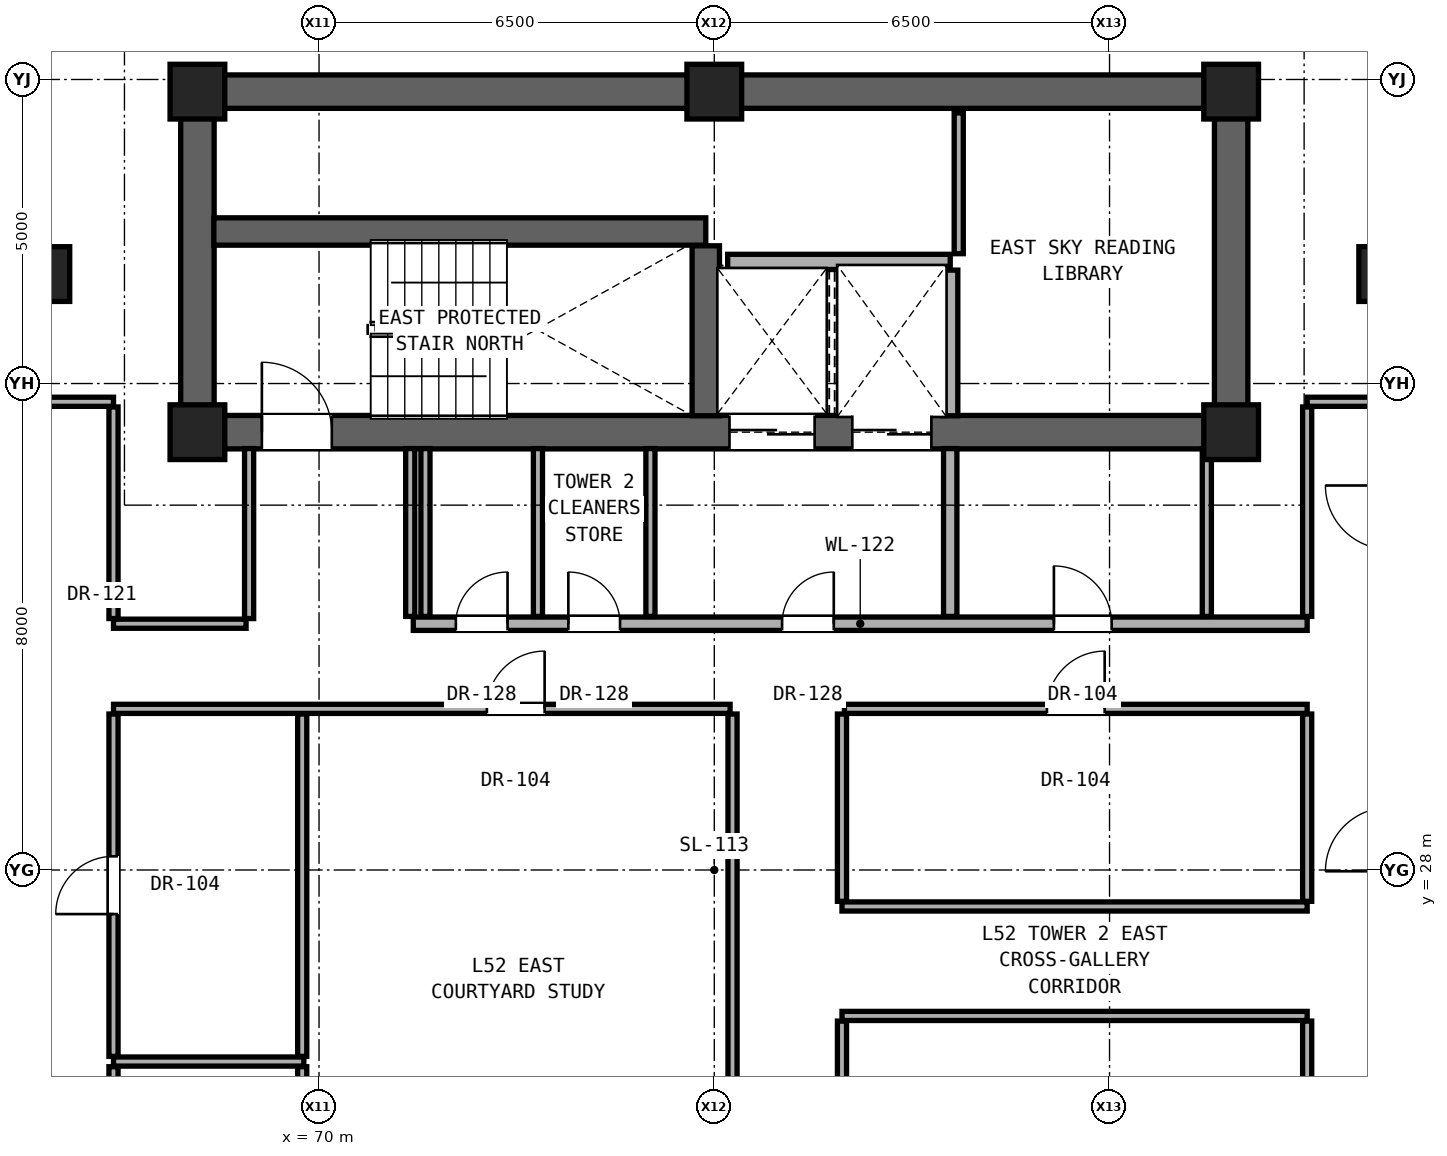
"""IFC4 building model, lengths in metres.
Left out: names, types, materials, properties, quantities, classifications, styles, units other than length and angle.
Written with IfcOpenShell. Run it as: python <this file> out.ifc"""

import sys

from ifc_helpers import new_model, si_unit, direction, frame, frame_2d, origin, origin_2d, place, context, subcontext, project, spatial, rectangle, extrude, element, fill, save


model = new_model("IFC4")
c1 = context("Model", 3, precision=1e-05, world=origin(), true_north=direction((0.0, 1.0)))
c2 = subcontext(c1, "Body", "Model", "MODEL_VIEW")
j1 = project(units=[si_unit("LENGTHUNIT", "METRE"), si_unit("PLANEANGLEUNIT", "RADIAN")], contexts=[c1])
p1 = place(None, origin())
s1 = spatial("IfcSite", under=j1, at=p1, CompositionType="ELEMENT")
p2 = place(p1, origin())
s2 = spatial("IfcBuilding", under=s1, at=p2, CompositionType="ELEMENT")
p3 = place(p2, frame((0.0, 0.0, 183.65)))
s3 = spatial("IfcBuildingStorey", under=s2, at=p3, CompositionType="ELEMENT", Elevation=183.65)
for number, where, z_axis, x_axis in (
    (1, (68.0, 35.2, 0.0), (0.0, 0.0, 1.0), (1.0, 0.0, 0.0)),
    (2, (85.0, 35.2, 0.0), (0.0, 0.0, 1.0), (1.0, 0.0, 0.0)),
    (3, (68.0, 40.8, 0.0), (0.0, 0.0, 1.0), (1.0, 0.0, 0.0)),
    (4, (76.5, 40.8, 0.0), (0.0, 0.0, 1.0), (1.0, 0.0, 0.0)),
    (5, (85.0, 40.8, 0.0), (0.0, 0.0, 1.0), (1.0, 0.0, 0.0)),
):
    element("IfcColumn", number, at=place(p3, frame(where, z_axis=z_axis, x_axis=x_axis)), inside=s3, PredefinedType="COLUMN", context=c2, shape_type="SweptSolid", body=[
        extrude(rectangle(XDim=0.9, YDim=0.9, at=origin_2d()), origin(), (0.0, 0.0, 1.0), 3.25),
    ])
for number, where, z_axis, x_axis in (
    (6, (65.6, 37.8, 0.0), (0.0, 0.0, 1.0), (1.0, 0.0, 0.0)),
    (7, (87.4, 37.8, 0.0), (0.0, 0.0, 1.0), (1.0, 0.0, 0.0)),
):
    element("IfcColumn", number, at=place(p3, frame(where, z_axis=z_axis, x_axis=x_axis)), inside=s3, PredefinedType="PILASTER", context=c2, shape_type="SweptSolid", body=[
        extrude(rectangle(XDim=0.6, YDim=0.9, at=origin_2d()), origin(), (0.0, 0.0, 1.0), 3.25),
    ])
p4 = place(p3, frame((68.0, 40.8, 0.0), z_axis=(0.0, 0.0, 1.0), x_axis=(1.0, 0.0, 0.0)))
e8 = element("IfcWall", 8, at=p4, inside=s3, PredefinedType="SHEAR", context=c2, shape_type="SweptSolid", body=[
    extrude(rectangle(XDim=17.0, YDim=0.55, at=frame_2d((8.5, 0.0))), origin(), (0.0, 0.0, 1.0), 3.05),
])
for number, where, z_axis, x_axis in (
    (9, (68.0, 35.2, 0.0), (0.0, 0.0, 1.0), (0.0, 1.0, 0.0)),
    (10, (85.0, 35.2, 0.0), (0.0, 0.0, 1.0), (0.0, 1.0, 0.0)),
):
    element("IfcWall", number, at=place(p3, frame(where, z_axis=z_axis, x_axis=x_axis)), inside=s3, PredefinedType="SHEAR", context=c2, shape_type="SweptSolid", body=[
        extrude(rectangle(XDim=5.6, YDim=0.55, at=frame_2d((2.8, 0.0))), origin(), (0.0, 0.0, 1.0), 3.05),
    ])
p5 = place(p3, frame((68.0, 35.2, 0.0), z_axis=(0.0, 0.0, 1.0), x_axis=(1.0, 0.0, 0.0)))
e11 = element("IfcWall", 11, at=p5, inside=s3, PredefinedType="SHEAR", context=c2, shape_type="SweptSolid", body=[
    extrude(rectangle(XDim=17.0, YDim=0.55, at=frame_2d((8.5, 0.0))), origin(), (0.0, 0.0, 1.0), 3.05),
])
p6 = place(p5, frame((1.06, 0.0, 0.0)))
e12 = element("IfcOpeningElement", 12, at=p6, cuts=e11, PredefinedType="OPENING", context=c2, shape_type="SweptSolid", body=[
    extrude(rectangle(XDim=1.15, YDim=2.2, at=frame_2d((0.575, 1.1))), frame((0.0, 0.285, 0.0), z_axis=(0.0, -1.0, 0.0), x_axis=(1.0, 0.0, 0.0)), (0.0, 0.0, 1.0), 0.57),
])
p7 = place(p5, frame((8.75, 0.0, 0.0)))
e13 = element("IfcOpeningElement", 13, at=p7, cuts=e11, PredefinedType="OPENING", context=c2, shape_type="SweptSolid", body=[
    extrude(rectangle(XDim=1.4, YDim=2.35, at=frame_2d((0.7, 1.175))), frame((0.0, 0.285, 0.0), z_axis=(0.0, -1.0, 0.0), x_axis=(1.0, 0.0, 0.0)), (0.0, 0.0, 1.0), 0.57),
])
p8 = place(p5, frame((10.77, 0.0, 0.0)))
e14 = element("IfcOpeningElement", 14, at=p8, cuts=e11, PredefinedType="OPENING", context=c2, shape_type="SweptSolid", body=[
    extrude(rectangle(XDim=1.3, YDim=2.3, at=frame_2d((0.65, 1.15))), frame((0.0, 0.285, 0.0), z_axis=(0.0, -1.0, 0.0), x_axis=(1.0, 0.0, 0.0)), (0.0, 0.0, 1.0), 0.57),
])
p9 = place(p3, frame((66.62, 24.85, 0.0), z_axis=(0.0, 0.0, 1.0), x_axis=(1.0, 0.0, 0.0)))
e15 = element("IfcWall", 15, at=p9, inside=s3, PredefinedType="PARTITIONING", context=c2, shape_type="SweptSolid", body=[
    extrude(rectangle(XDim=3.13, YDim=0.15, at=frame_2d((1.565, 0.0))), origin(), (0.0, 0.0, 1.0), 2.186),
])
for number, where, z_axis, x_axis in (
    (16, (78.6, 25.6, 0.0), (0.0, 0.0, 1.0), (1.0, 0.0, 0.0)),
    (17, (78.6, 27.4, 0.0), (0.0, 0.0, 1.0), (1.0, 0.0, 0.0)),
):
    element("IfcWall", number, at=place(p3, frame(where, z_axis=z_axis, x_axis=x_axis)), inside=s3, PredefinedType="PARTITIONING", context=c2, shape_type="SweptSolid", body=[
        extrude(rectangle(XDim=7.65, YDim=0.15, at=frame_2d((3.825, 0.0))), origin(), (0.0, 0.0, 1.0), 2.186),
    ])
p10 = place(p3, frame((66.62, 30.65, 0.0), z_axis=(0.0, 0.0, 1.0), x_axis=(1.0, 0.0, 0.0)))
e18 = element("IfcWall", 18, at=p10, inside=s3, PredefinedType="PARTITIONING", context=c2, shape_type="SweptSolid", body=[
    extrude(rectangle(XDim=10.14, YDim=0.15, at=frame_2d((5.07, 0.0))), origin(), (0.0, 0.0, 1.0), 2.186),
])
p11 = place(p10, frame((6.14, 0.0, 0.0)))
e19 = element("IfcOpeningElement", 19, at=p11, cuts=e18, PredefinedType="OPENING", context=c2, shape_type="SweptSolid", body=[
    extrude(rectangle(XDim=0.95, YDim=2.15, at=frame_2d((0.475, 1.075))), frame((0.0, 0.085, 0.0), z_axis=(0.0, -1.0, 0.0), x_axis=(1.0, 0.0, 0.0)), (0.0, 0.0, 1.0), 0.17),
])
p12 = place(p3, frame((78.64, 30.65, 0.0), z_axis=(0.0, 0.0, 1.0), x_axis=(1.0, 0.0, 0.0)))
e20 = element("IfcWall", 20, at=p12, inside=s3, PredefinedType="PARTITIONING", context=c2, shape_type="SweptSolid", body=[
    extrude(rectangle(XDim=7.61, YDim=0.15, at=frame_2d((3.805, 0.0))), origin(), (0.0, 0.0, 1.0), 2.186),
])
p13 = place(p12, frame((3.33, 0.0, 0.0)))
e21 = element("IfcOpeningElement", 21, at=p13, cuts=e20, PredefinedType="OPENING", context=c2, shape_type="SweptSolid", body=[
    extrude(rectangle(XDim=0.95, YDim=2.15, at=frame_2d((0.475, 1.075))), frame((0.0, 0.085, 0.0), z_axis=(0.0, -1.0, 0.0), x_axis=(1.0, 0.0, 0.0)), (0.0, 0.0, 1.0), 0.17),
])
p14 = place(p3, frame((66.62, 32.05, 0.0), z_axis=(0.0, 0.0, 1.0), x_axis=(1.0, 0.0, 0.0)))
e22 = element("IfcWall", 22, at=p14, inside=s3, PredefinedType="PARTITIONING", context=c2, shape_type="SweptSolid", body=[
    extrude(rectangle(XDim=2.18, YDim=0.15, at=frame_2d((1.09, 0.0))), origin(), (0.0, 0.0, 1.0), 2.186),
])
p15 = place(p3, frame((71.55, 32.05, 0.0), z_axis=(0.0, 0.0, 1.0), x_axis=(1.0, 0.0, 0.0)))
e23 = element("IfcWall", 23, at=p15, inside=s3, PredefinedType="SOLIDWALL", context=c2, shape_type="SweptSolid", body=[
    extrude(rectangle(XDim=14.7, YDim=0.22, at=frame_2d((7.35, 0.0))), origin(), (0.0, 0.0, 1.0), 2.186),
])
p16 = place(p15, frame((6.065, 0.0, 0.0)))
e24 = element("IfcOpeningElement", 24, at=p16, cuts=e23, PredefinedType="OPENING", context=c2, shape_type="SweptSolid", body=[
    extrude(rectangle(XDim=0.85, YDim=2.01, at=frame_2d((0.425, 1.005))), frame((0.0, 0.12, 0.0), z_axis=(0.0, -1.0, 0.0), x_axis=(1.0, 0.0, 0.0)), (0.0, 0.0, 1.0), 0.24),
])
p17 = place(p15, frame((10.535, 0.0, 0.0)))
e25 = element("IfcOpeningElement", 25, at=p17, cuts=e23, PredefinedType="OPENING", context=c2, shape_type="SweptSolid", body=[
    extrude(rectangle(XDim=0.95, YDim=2.15, at=frame_2d((0.475, 1.075))), frame((0.0, 0.12, 0.0), z_axis=(0.0, -1.0, 0.0), x_axis=(1.0, 0.0, 0.0)), (0.0, 0.0, 1.0), 0.24),
])
p18 = place(p15, frame((0.7, 0.0, 0.0)))
e26 = element("IfcOpeningElement", 26, at=p18, cuts=e23, PredefinedType="OPENING", context=c2, shape_type="SweptSolid", body=[
    extrude(rectangle(XDim=0.85, YDim=2.01, at=frame_2d((0.425, 1.005))), frame((0.0, 0.12, 0.0), z_axis=(0.0, -1.0, 0.0), x_axis=(1.0, 0.0, 0.0)), (0.0, 0.0, 1.0), 0.24),
])
p19 = place(p15, frame((2.55, 0.0, 0.0)))
e27 = element("IfcOpeningElement", 27, at=p19, cuts=e23, PredefinedType="OPENING", context=c2, shape_type="SweptSolid", body=[
    extrude(rectangle(XDim=0.85, YDim=2.01, at=frame_2d((0.425, 1.005))), frame((0.0, 0.12, 0.0), z_axis=(0.0, -1.0, 0.0), x_axis=(1.0, 0.0, 0.0)), (0.0, 0.0, 1.0), 0.24),
])
p20 = place(p3, frame((65.25, 35.7, 0.0), z_axis=(0.0, 0.0, 1.0), x_axis=(1.0, 0.0, 0.0)))
e28 = element("IfcWall", 28, at=p20, inside=s3, PredefinedType="PARTITIONING", context=c2, shape_type="SweptSolid", body=[
    extrude(rectangle(XDim=1.37, YDim=0.15, at=frame_2d((0.685, 0.0))), origin(), (0.0, 0.0, 1.0), 3.05),
])
p21 = place(p3, frame((86.25, 35.7, 0.0), z_axis=(0.0, 0.0, 1.0), x_axis=(1.0, 0.0, 0.0)))
e29 = element("IfcWall", 29, at=p21, inside=s3, PredefinedType="PARTITIONING", context=c2, shape_type="SweptSolid", body=[
    extrude(rectangle(XDim=1.35, YDim=0.15, at=frame_2d((0.675, 0.0))), origin(), (0.0, 0.0, 1.0), 3.05),
])
p22 = place(p3, frame((76.72, 38.0, 0.0), z_axis=(0.0, 0.0, 1.0), x_axis=(1.0, 0.0, 0.0)))
e30 = element("IfcWall", 30, at=p22, inside=s3, PredefinedType="SOLIDWALL", context=c2, shape_type="SweptSolid", body=[
    extrude(rectangle(XDim=3.66, YDim=0.25, at=frame_2d((1.83, 0.0))), origin(), (0.0, 0.0, 1.0), 3.05),
])
p23 = place(p3, frame((68.27, 38.5, 0.0), z_axis=(0.0, 0.0, 1.0), x_axis=(1.0, 0.0, 0.0)))
e31 = element("IfcWall", 31, at=p23, inside=s3, PredefinedType="SHEAR", context=c2, shape_type="SweptSolid", body=[
    extrude(rectangle(XDim=8.09, YDim=0.45, at=frame_2d((4.045, 0.0))), origin(), (0.0, 0.0, 1.0), 3.05),
])
p24 = place(p3, frame((66.62, 22.435, 0.0), z_axis=(0.0, 0.0, 1.0), x_axis=(0.0, 1.0, 0.0)))
e32 = element("IfcWall", 32, at=p24, inside=s3, PredefinedType="PARTITIONING", context=c2, shape_type="SweptSolid", body=[
    extrude(rectangle(XDim=2.33, YDim=0.15, at=frame_2d((1.165, 0.0))), origin(), (0.0, 0.0, 1.0), 3.05),
])
p25 = place(p24, frame((0.715, 0.0, 0.0)))
e33 = element("IfcOpeningElement", 33, at=p25, cuts=e32, PredefinedType="OPENING", context=c2, shape_type="SweptSolid", body=[
    extrude(rectangle(XDim=0.9, YDim=2.1, at=frame_2d((0.45, 1.05))), frame((0.0, 0.085, 0.0), z_axis=(0.0, -1.0, 0.0), x_axis=(1.0, 0.0, 0.0)), (0.0, 0.0, 1.0), 0.17),
])
p26 = place(p3, frame((66.62, 24.935, 0.0), z_axis=(0.0, 0.0, 1.0), x_axis=(0.0, 1.0, 0.0)))
e34 = element("IfcWall", 34, at=p26, inside=s3, PredefinedType="PARTITIONING", context=c2, shape_type="SweptSolid", body=[
    extrude(rectangle(XDim=5.63, YDim=0.15, at=frame_2d((2.815, 0.0))), origin(), (0.0, 0.0, 1.0), 2.346),
])
p27 = place(p26, frame((2.34, 0.0, 0.0)))
e35 = element("IfcOpeningElement", 35, at=p27, cuts=e34, PredefinedType="OPENING", context=c2, shape_type="SweptSolid", body=[
    extrude(rectangle(XDim=0.95, YDim=2.15, at=frame_2d((0.475, 1.075))), frame((0.0, 0.085, 0.0), z_axis=(0.0, -1.0, 0.0), x_axis=(1.0, 0.0, 0.0)), (0.0, 0.0, 1.0), 0.17),
])
p28 = place(p3, frame((66.62, 32.135, 0.0), z_axis=(0.0, 0.0, 1.0), x_axis=(0.0, 1.0, 0.0)))
e36 = element("IfcWall", 36, at=p28, inside=s3, PredefinedType="PARTITIONING", context=c2, shape_type="SweptSolid", body=[
    extrude(rectangle(XDim=3.48, YDim=0.15, at=frame_2d((1.74, 0.0))), origin(), (0.0, 0.0, 1.0), 2.442),
])
p29 = place(p3, frame((68.85, 32.135, 0.0), z_axis=(0.0, 0.0, 1.0), x_axis=(0.0, 1.0, 0.0)))
e37 = element("IfcWall", 37, at=p29, inside=s3, PredefinedType="PARTITIONING", context=c2, shape_type="SweptSolid", body=[
    extrude(rectangle(XDim=2.795, YDim=0.15, at=frame_2d((1.397, 0.0))), origin(), (0.0, 0.0, 1.0), 3.05),
])
p30 = place(p3, frame((69.723, 22.435, 0.0), z_axis=(0.0, 0.0, 1.0), x_axis=(0.0, 1.0, 0.0)))
e38 = element("IfcWall", 38, at=p30, inside=s3, PredefinedType="PARTITIONING", context=c2, shape_type="SweptSolid", body=[
    extrude(rectangle(XDim=2.33, YDim=0.15, at=frame_2d((1.165, 0.0))), origin(), (0.0, 0.0, 1.0), 3.05),
])
p31 = place(p3, frame((69.723, 24.935, 0.0), z_axis=(0.0, 0.0, 1.0), x_axis=(0.0, 1.0, 0.0)))
e39 = element("IfcWall", 39, at=p31, inside=s3, PredefinedType="PARTITIONING", context=c2, shape_type="SweptSolid", body=[
    extrude(rectangle(XDim=5.63, YDim=0.15, at=frame_2d((2.815, 0.0))), origin(), (0.0, 0.0, 1.0), 2.186),
])
for number, where, z_axis, x_axis in (
    (40, (71.5, 32.17, 0.0), (0.0, 0.0, 1.0), (0.0, 1.0, 0.0)),
    (41, (71.75, 32.17, 0.0), (0.0, 0.0, 1.0), (0.0, 1.0, 0.0)),
    (42, (73.6, 32.17, 0.0), (0.0, 0.0, 1.0), (0.0, 1.0, 0.0)),
    (43, (75.45, 32.17, 0.0), (0.0, 0.0, 1.0), (0.0, 1.0, 0.0)),
):
    element("IfcWall", number, at=place(p3, frame(where, z_axis=z_axis, x_axis=x_axis)), inside=s3, PredefinedType="PARTITIONING", context=c2, shape_type="SweptSolid", body=[
        extrude(rectangle(XDim=2.76, YDim=0.15, at=frame_2d((1.38, 0.0))), origin(), (0.0, 0.0, 1.0), 3.05),
    ])
p32 = place(p3, frame((76.36, 35.47, 0.0), z_axis=(0.0, 0.0, 1.0), x_axis=(0.0, 1.0, 0.0)))
e44 = element("IfcWall", 44, at=p32, inside=s3, PredefinedType="SHEAR", context=c2, shape_type="SweptSolid", body=[
    extrude(rectangle(XDim=2.795, YDim=0.45, at=frame_2d((1.397, 0.0))), origin(), (0.0, 0.0, 1.0), 3.05),
])
p33 = place(p3, frame((76.8, 22.435, 0.0), z_axis=(0.0, 0.0, 1.0), x_axis=(0.0, 1.0, 0.0)))
e45 = element("IfcWall", 45, at=p33, inside=s3, PredefinedType="PARTITIONING", context=c2, shape_type="SweptSolid", body=[
    extrude(rectangle(XDim=8.13, YDim=0.15, at=frame_2d((4.065, 0.0))), origin(), (0.0, 0.0, 1.0), 2.186),
])
p34 = place(p3, frame((78.6, 22.435, 0.0), z_axis=(0.0, 0.0, 1.0), x_axis=(0.0, 1.0, 0.0)))
e46 = element("IfcWall", 46, at=p34, inside=s3, PredefinedType="PARTITIONING", context=c2, shape_type="SweptSolid", body=[
    extrude(rectangle(XDim=3.08, YDim=0.15, at=frame_2d((1.54, 0.0))), origin(), (0.0, 0.0, 1.0), 3.05),
])
p35 = place(p3, frame((78.6, 27.485, 0.0), z_axis=(0.0, 0.0, 1.0), x_axis=(0.0, 1.0, 0.0)))
e47 = element("IfcWall", 47, at=p35, inside=s3, PredefinedType="PARTITIONING", context=c2, shape_type="SweptSolid", body=[
    extrude(rectangle(XDim=3.08, YDim=0.15, at=frame_2d((1.54, 0.0))), origin(), (0.0, 0.0, 1.0), 2.186),
])
p36 = place(p3, frame((80.38, 32.17, 0.0), z_axis=(0.0, 0.0, 1.0), x_axis=(0.0, 1.0, 0.0)))
e48 = element("IfcWall", 48, at=p36, inside=s3, PredefinedType="SOLIDWALL", context=c2, shape_type="SweptSolid", body=[
    extrude(rectangle(XDim=2.76, YDim=0.22, at=frame_2d((1.38, 0.0))), origin(), (0.0, 0.0, 1.0), 3.05),
])
p37 = place(p3, frame((80.38, 35.47, 0.0), z_axis=(0.0, 0.0, 1.0), x_axis=(0.0, 1.0, 0.0)))
e49 = element("IfcWall", 49, at=p37, inside=s3, PredefinedType="SOLIDWALL", context=c2, shape_type="SweptSolid", body=[
    extrude(rectangle(XDim=2.395, YDim=0.25, at=frame_2d((1.198, 0.0))), origin(), (0.0, 0.0, 1.0), 3.05),
])
p38 = place(p3, frame((80.52, 38.135, 0.0), z_axis=(0.0, 0.0, 1.0), x_axis=(0.0, 1.0, 0.0)))
e50 = element("IfcWall", 50, at=p38, inside=s3, PredefinedType="PARTITIONING", context=c2, shape_type="SweptSolid", body=[
    extrude(rectangle(XDim=2.315, YDim=0.15, at=frame_2d((1.157, 0.0))), origin(), (0.0, 0.0, 1.0), 3.05),
])
p39 = place(p3, frame((84.6, 32.17, 0.0), z_axis=(0.0, 0.0, 1.0), x_axis=(0.0, 1.0, 0.0)))
e51 = element("IfcWall", 51, at=p39, inside=s3, PredefinedType="PARTITIONING", context=c2, shape_type="SweptSolid", body=[
    extrude(rectangle(XDim=2.76, YDim=0.15, at=frame_2d((1.38, 0.0))), origin(), (0.0, 0.0, 1.0), 3.05),
])
p40 = place(p3, frame((86.25, 22.435, 0.0), z_axis=(0.0, 0.0, 1.0), x_axis=(0.0, 1.0, 0.0)))
e52 = element("IfcWall", 52, at=p40, inside=s3, PredefinedType="PARTITIONING", context=c2, shape_type="SweptSolid", body=[
    extrude(rectangle(XDim=3.08, YDim=0.15, at=frame_2d((1.54, 0.0))), origin(), (0.0, 0.0, 1.0), 3.05),
])
p41 = place(p3, frame((86.25, 27.485, 0.0), z_axis=(0.0, 0.0, 1.0), x_axis=(0.0, 1.0, 0.0)))
e53 = element("IfcWall", 53, at=p41, inside=s3, PredefinedType="PARTITIONING", context=c2, shape_type="SweptSolid", body=[
    extrude(rectangle(XDim=3.08, YDim=0.15, at=frame_2d((1.54, 0.0))), origin(), (0.0, 0.0, 1.0), 2.346),
])
p42 = place(p3, frame((86.25, 32.17, 0.0), z_axis=(0.0, 0.0, 1.0), x_axis=(0.0, 1.0, 0.0)))
e54 = element("IfcWall", 54, at=p42, inside=s3, PredefinedType="PARTITIONING", context=c2, shape_type="SweptSolid", body=[
    extrude(rectangle(XDim=3.445, YDim=0.15, at=frame_2d((1.723, 0.0))), origin(), (0.0, 0.0, 1.0), 2.442),
])
p43 = place(p6, origin())
e55 = element("IfcDoor", 55, at=p43, inside=s3, OperationType="SINGLE_SWING_LEFT", PredefinedType="DOOR", context=c2, shape_type="SweptSolid", body=[
    extrude(rectangle(XDim=1.15, YDim=2.2, at=frame_2d((0.575, 1.1))), frame((0.0, 0.025, 0.0), z_axis=(0.0, -1.0, 0.0), x_axis=(1.0, 0.0, 0.0)), (0.0, 0.0, 1.0), 0.05),
])
fill(e12, e55)
p44 = place(p16, origin())
e56 = element("IfcDoor", 56, at=p44, inside=s3, OperationType="SINGLE_SWING_RIGHT", PredefinedType="DOOR", context=c2, shape_type="SweptSolid", body=[
    extrude(rectangle(XDim=0.85, YDim=2.01, at=frame_2d((0.425, 1.005))), frame((0.0, 0.025, 0.0), z_axis=(0.0, -1.0, 0.0), x_axis=(1.0, 0.0, 0.0)), (0.0, 0.0, 1.0), 0.05),
])
fill(e24, e56)
p45 = place(p17, origin())
e57 = element("IfcDoor", 57, at=p45, inside=s3, OperationType="SINGLE_SWING_LEFT", PredefinedType="DOOR", context=c2, shape_type="SweptSolid", body=[
    extrude(rectangle(XDim=0.95, YDim=2.15, at=frame_2d((0.475, 1.075))), frame((0.0, 0.025, 0.0), z_axis=(0.0, -1.0, 0.0), x_axis=(1.0, 0.0, 0.0)), (0.0, 0.0, 1.0), 0.05),
])
fill(e25, e57)
p46 = place(p18, origin())
e58 = element("IfcDoor", 58, at=p46, inside=s3, OperationType="SINGLE_SWING_RIGHT", PredefinedType="DOOR", context=c2, shape_type="SweptSolid", body=[
    extrude(rectangle(XDim=0.85, YDim=2.01, at=frame_2d((0.425, 1.005))), frame((0.0, 0.025, 0.0), z_axis=(0.0, -1.0, 0.0), x_axis=(1.0, 0.0, 0.0)), (0.0, 0.0, 1.0), 0.05),
])
fill(e26, e58)
p47 = place(p19, origin())
e59 = element("IfcDoor", 59, at=p47, inside=s3, OperationType="SINGLE_SWING_LEFT", PredefinedType="DOOR", context=c2, shape_type="SweptSolid", body=[
    extrude(rectangle(XDim=0.85, YDim=2.01, at=frame_2d((0.425, 1.005))), frame((0.0, 0.025, 0.0), z_axis=(0.0, -1.0, 0.0), x_axis=(1.0, 0.0, 0.0)), (0.0, 0.0, 1.0), 0.05),
])
fill(e27, e59)
p48 = place(p27, origin())
e60 = element("IfcDoor", 60, at=p48, inside=s3, OperationType="SINGLE_SWING_LEFT", PredefinedType="DOOR", context=c2, shape_type="SweptSolid", body=[
    extrude(rectangle(XDim=0.95, YDim=2.15, at=frame_2d((0.475, 1.075))), frame((0.0, 0.025, 0.0), z_axis=(0.0, -1.0, 0.0), x_axis=(1.0, 0.0, 0.0)), (0.0, 0.0, 1.0), 0.05),
])
fill(e35, e60)
p49 = place(p11, origin())
e61 = element("IfcDoor", 61, at=p49, inside=s3, OperationType="SINGLE_SWING_RIGHT", PredefinedType="DOOR", context=c2, shape_type="SweptSolid", body=[
    extrude(rectangle(XDim=0.95, YDim=2.15, at=frame_2d((0.475, 1.075))), frame((0.0, 0.025, 0.0), z_axis=(0.0, -1.0, 0.0), x_axis=(1.0, 0.0, 0.0)), (0.0, 0.0, 1.0), 0.05),
])
fill(e19, e61)
p50 = place(p13, origin())
e62 = element("IfcDoor", 62, at=p50, inside=s3, OperationType="SINGLE_SWING_RIGHT", PredefinedType="DOOR", context=c2, shape_type="SweptSolid", body=[
    extrude(rectangle(XDim=0.95, YDim=2.15, at=frame_2d((0.475, 1.075))), frame((0.0, 0.025, 0.0), z_axis=(0.0, -1.0, 0.0), x_axis=(1.0, 0.0, 0.0)), (0.0, 0.0, 1.0), 0.05),
])
fill(e21, e62)
p51 = place(p7, origin())
e63 = element("IfcDoor", 63, at=p51, inside=s3, OperationType="DOUBLE_DOOR_SLIDING", PredefinedType="DOOR", context=c2, shape_type="SweptSolid", body=[
    extrude(rectangle(XDim=1.4, YDim=2.35, at=frame_2d((0.7, 1.175))), frame((0.0, 0.025, 0.0), z_axis=(0.0, -1.0, 0.0), x_axis=(1.0, 0.0, 0.0)), (0.0, 0.0, 1.0), 0.05),
])
fill(e13, e63)
p52 = place(p8, origin())
e64 = element("IfcDoor", 64, at=p52, inside=s3, OperationType="DOUBLE_DOOR_SLIDING", PredefinedType="DOOR", context=c2, shape_type="SweptSolid", body=[
    extrude(rectangle(XDim=1.3, YDim=2.3, at=frame_2d((0.65, 1.15))), frame((0.0, 0.025, 0.0), z_axis=(0.0, -1.0, 0.0), x_axis=(1.0, 0.0, 0.0)), (0.0, 0.0, 1.0), 0.05),
])
fill(e14, e64)
save(model, sys.argv[1])
